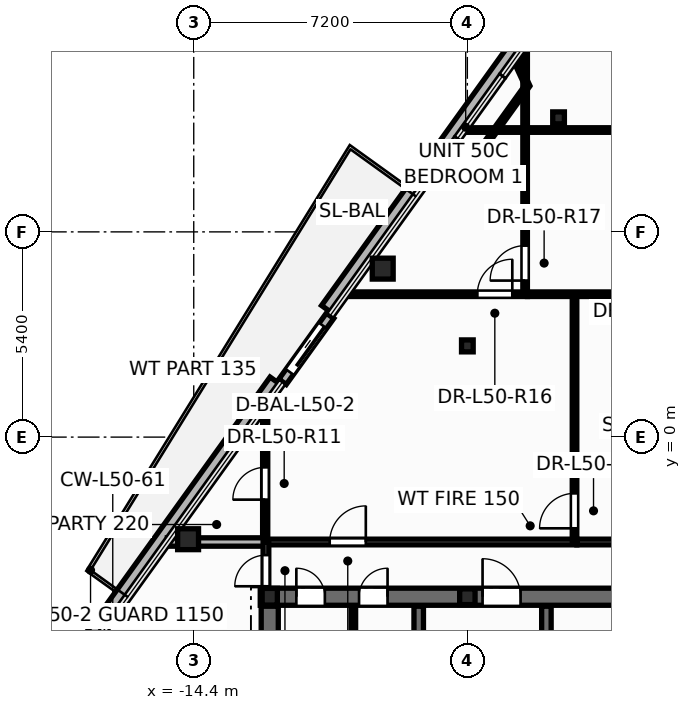
"""IFC4 building model, lengths in metres.
Left out: names, types, materials, properties, quantities, classifications, styles, units other than length and angle.
Written with IfcOpenShell. Run it as: python <this file> out.ifc"""

import sys

from ifc_helpers import new_model, si_unit, direction, frame, frame_2d, origin, origin_2d, place, context, subcontext, project, spatial, rectangle, hollow_circle, i_section, extrude, element, fill, save


model = new_model("IFC4")
c1 = context("Model", 3, precision=1e-05, world=origin(), true_north=direction((0.0, 1.0)))
c2 = subcontext(c1, "Body", "Model", "MODEL_VIEW")
j1 = project(units=[si_unit("LENGTHUNIT", "METRE"), si_unit("PLANEANGLEUNIT", "RADIAN")], contexts=[c1])
p1 = place(None, origin())
s1 = spatial("IfcSite", under=j1, at=p1, CompositionType="ELEMENT")
p2 = place(p1, origin())
s2 = spatial("IfcBuilding", under=s1, at=p2, CompositionType="ELEMENT")
p3 = place(p2, frame((0.0, 0.0, 192.9)))
s3 = spatial("IfcBuildingStorey", under=s2, at=p3, CompositionType="ELEMENT", Elevation=192.9)
for number, where, z_axis, x_axis in (
    (1, (-9.427, 4.433, 0.0), (0.0, 0.0, 1.0), (1.0, 0.0, 0.0)),
    (2, (-14.549, -2.686, 0.0), (0.0, 0.0, 1.0), (1.0, 0.0, 0.0)),
):
    element("IfcColumn", number, at=place(p3, frame(where, z_axis=z_axis, x_axis=x_axis)), inside=s3, PredefinedType="COLUMN", context=c2, shape_type="SweptSolid", body=[
        extrude(hollow_circle(Radius=0.275, WallThickness=0.024, at=origin_2d()), origin(), (0.0, 0.0, 1.0), 3.6),
    ])
p4 = place(p3, frame((-12.4, -4.2, 0.0), z_axis=(0.0, 0.0, 1.0), x_axis=(1.0, 0.0, 0.0)))
e3 = element("IfcColumn", 3, at=p4, inside=s3, PredefinedType="COLUMN", context=c2, shape_type="SweptSolid", body=[
    extrude(i_section(OverallWidth=0.4, OverallDepth=0.44, WebThickness=0.028, FlangeThickness=0.04, at=origin_2d()), origin(), (0.0, 0.0, 1.0), 3.6),
])
p5 = place(p3, frame((-7.2, -4.2, 0.0), z_axis=(0.0, 0.0, 1.0), x_axis=(1.0, 0.0, 0.0)))
e4 = element("IfcColumn", 4, at=p5, inside=s3, PredefinedType="PILASTER", context=c2, shape_type="SweptSolid", body=[
    extrude(i_section(OverallWidth=0.405, OverallDepth=0.414, WebThickness=0.022, FlangeThickness=0.032, at=origin_2d()), origin(), (0.0, 0.0, 1.0), 3.6),
])
for number, where, z_axis, x_axis in (
    (5, (-7.2, 2.4, 0.0), (0.0, 0.0, 1.0), (1.0, 0.0, 0.0)),
    (6, (-4.8, 8.4, 0.0), (0.0, 0.0, 1.0), (1.0, 0.0, 0.0)),
):
    element("IfcColumn", number, at=place(p3, frame(where, z_axis=z_axis, x_axis=x_axis)), inside=s3, PredefinedType="COLUMN", context=c2, shape_type="SweptSolid", body=[
        extrude(i_section(OverallWidth=0.307, OverallDepth=0.314, WebThickness=0.012, FlangeThickness=0.019, at=origin_2d()), origin(), (0.0, 0.0, 1.0), 3.6),
    ])
p6 = place(p3, frame((-3.857, 13.135, -0.2), z_axis=(0.0, 0.0, 1.0), x_axis=(-0.583988536217, -0.811761904481, 0.0)))
e7 = element("IfcWall", 7, at=p6, inside=s3, PredefinedType="PARAPET", context=c2, shape_type="SweptSolid", body=[
    extrude(rectangle(XDim=12.043, YDim=0.36, at=frame_2d((6.022, 0.0))), origin(), (0.0, 0.0, 1.0), 0.38),
])
p7 = place(p3, frame((-12.245, 1.475, -0.2), z_axis=(0.0, 0.0, 1.0), x_axis=(-0.583980615351, -0.811767602762, 0.0)))
e8 = element("IfcWall", 8, at=p7, inside=s3, PredefinedType="PARAPET", context=c2, shape_type="SweptSolid", body=[
    extrude(rectangle(XDim=15.123, YDim=0.36, at=frame_2d((7.562, 0.0))), origin(), (0.0, 0.0, 1.0), 0.38),
])
p8 = place(p3, frame((-10.813, 3.192, -0.015), z_axis=(0.0, 0.0, 1.0), x_axis=(-0.583965085393, -0.811778774693, 0.0)))
e9 = element("IfcWall", 9, at=p8, inside=s3, PredefinedType="STANDARD", context=c2, shape_type="SweptSolid", body=[
    extrude(rectangle(XDim=2.14, YDim=0.24, at=frame_2d((1.07, 0.0))), origin(), (0.0, 0.0, 1.0), 2.807),
])
p9 = place(p8, frame((0.32, 0.0, 0.015)))
e10 = element("IfcOpeningElement", 10, at=p9, cuts=e9, PredefinedType="OPENING", context=c2, shape_type="SweptSolid", body=[
    extrude(rectangle(XDim=1.506, YDim=2.204, at=frame_2d((0.75, 1.102))), frame((0.0, 0.13, 0.0), z_axis=(0.0, -1.0, 0.0), x_axis=(1.0, 0.0, 0.0)), (0.0, 0.0, 1.0), 0.26),
])
p10 = place(p3, frame((-10.2, -5.52, 0.0), z_axis=(0.0, 0.0, 1.0), x_axis=(0.0, 1.0, 0.0)))
e11 = element("IfcWall", 11, at=p10, inside=s3, PredefinedType="PARTITIONING", context=c2, shape_type="SweptSolid", body=[
    extrude(rectangle(XDim=1.12, YDim=0.12, at=frame_2d((0.56, 0.0))), origin(), (0.0, 0.0, 1.0), 3.35),
])
p11 = place(p3, frame((-12.65, -4.2, 0.0), z_axis=(0.0, 0.0, 1.0), x_axis=(1.0, 0.0, 0.0)))
e12 = element("IfcWall", 12, at=p11, inside=s3, PredefinedType="SHEAR", context=c2, shape_type="SweptSolid", body=[
    extrude(rectangle(XDim=25.3, YDim=0.45, at=frame_2d((12.65, 0.0))), origin(), (0.0, 0.0, 1.0), 3.6),
])
p12 = place(p11, frame((0.95, 0.0, 0.0)))
e13 = element("IfcOpeningElement", 13, at=p12, cuts=e12, PredefinedType="OPENING", context=c2, shape_type="SweptSolid", body=[
    extrude(rectangle(XDim=0.756, YDim=2.054, at=frame_2d((0.375, 1.027))), frame((0.0, 0.235, 0.0), z_axis=(0.0, -1.0, 0.0), x_axis=(1.0, 0.0, 0.0)), (0.0, 0.0, 1.0), 0.47),
])
p13 = place(p11, frame((2.6, 0.0, 0.0)))
e14 = element("IfcOpeningElement", 14, at=p13, cuts=e12, PredefinedType="OPENING", context=c2, shape_type="SweptSolid", body=[
    extrude(rectangle(XDim=0.756, YDim=2.054, at=frame_2d((0.375, 1.027))), frame((0.0, 0.235, 0.0), z_axis=(0.0, -1.0, 0.0), x_axis=(1.0, 0.0, 0.0)), (0.0, 0.0, 1.0), 0.47),
])
p14 = place(p11, frame((21.85, 0.0, 0.0)))
e15 = element("IfcOpeningElement", 15, at=p14, cuts=e12, PredefinedType="OPENING", context=c2, shape_type="SweptSolid", body=[
    extrude(rectangle(XDim=0.756, YDim=2.054, at=frame_2d((0.375, 1.027))), frame((0.0, 0.235, 0.0), z_axis=(0.0, -1.0, 0.0), x_axis=(1.0, 0.0, 0.0)), (0.0, 0.0, 1.0), 0.47),
])
p15 = place(p11, frame((23.5, 0.0, 0.0)))
e16 = element("IfcOpeningElement", 16, at=p15, cuts=e12, PredefinedType="OPENING", context=c2, shape_type="SweptSolid", body=[
    extrude(rectangle(XDim=0.756, YDim=2.054, at=frame_2d((0.375, 1.027))), frame((0.0, 0.235, 0.0), z_axis=(0.0, -1.0, 0.0), x_axis=(1.0, 0.0, 0.0)), (0.0, 0.0, 1.0), 0.47),
])
p16 = place(p11, frame((5.85, 0.0, 0.0)))
e17 = element("IfcOpeningElement", 17, at=p16, cuts=e12, PredefinedType="OPENING", context=c2, shape_type="SweptSolid", body=[
    extrude(rectangle(XDim=1.006, YDim=2.104, at=frame_2d((0.5, 1.052))), frame((0.0, 0.235, 0.0), z_axis=(0.0, -1.0, 0.0), x_axis=(1.0, 0.0, 0.0)), (0.0, 0.0, 1.0), 0.47),
])
p17 = place(p11, frame((10.35, 0.0, 0.0)))
e18 = element("IfcOpeningElement", 18, at=p17, cuts=e12, PredefinedType="OPENING", context=c2, shape_type="SweptSolid", body=[
    extrude(rectangle(XDim=1.406, YDim=2.154, at=frame_2d((0.7, 1.077))), frame((0.0, 0.235, 0.0), z_axis=(0.0, -1.0, 0.0), x_axis=(1.0, 0.0, 0.0)), (0.0, 0.0, 1.0), 0.47),
])
p18 = place(p11, frame((18.45, 0.0, 0.0)))
e19 = element("IfcOpeningElement", 19, at=p18, cuts=e12, PredefinedType="OPENING", context=c2, shape_type="SweptSolid", body=[
    extrude(rectangle(XDim=1.006, YDim=2.104, at=frame_2d((0.5, 1.052))), frame((0.0, 0.235, 0.0), z_axis=(0.0, -1.0, 0.0), x_axis=(1.0, 0.0, 0.0)), (0.0, 0.0, 1.0), 0.47),
])
p19 = place(p3, frame((-8.48, -13.85, 0.0), z_axis=(0.0, 0.0, 1.0), x_axis=(0.0, 1.0, 0.0)))
e20 = element("IfcWall", 20, at=p19, inside=s3, PredefinedType="SHEAR", context=c2, shape_type="SweptSolid", body=[
    extrude(rectangle(XDim=9.4, YDim=0.25, at=frame_2d((4.7, 0.0))), origin(), (0.0, 0.0, 1.0), 3.6),
])
p20 = place(p19, frame((6.95, 0.0, 0.0)))
e21 = element("IfcOpeningElement", 21, at=p20, cuts=e20, PredefinedType="OPENING", context=c2, shape_type="SweptSolid", body=[
    extrude(rectangle(XDim=1.006, YDim=2.104, at=frame_2d((0.5, 1.052))), frame((0.0, 0.135, 0.0), z_axis=(0.0, -1.0, 0.0), x_axis=(1.0, 0.0, 0.0)), (0.0, 0.0, 1.0), 0.27),
])
p21 = place(p3, frame((-5.12, -13.85, 0.0), z_axis=(0.0, 0.0, 1.0), x_axis=(0.0, 1.0, 0.0)))
e22 = element("IfcWall", 22, at=p21, inside=s3, PredefinedType="SHEAR", context=c2, shape_type="SweptSolid", body=[
    extrude(rectangle(XDim=9.4, YDim=0.25, at=frame_2d((4.7, 0.0))), origin(), (0.0, 0.0, 1.0), 3.6),
])
p22 = place(p3, frame((-12.4, -13.85, 0.0), z_axis=(0.0, 0.0, 1.0), x_axis=(0.0, 1.0, 0.0)))
e23 = element("IfcWall", 23, at=p22, inside=s3, PredefinedType="SHEAR", context=c2, shape_type="SweptSolid", body=[
    extrude(rectangle(XDim=9.4, YDim=0.45, at=frame_2d((4.7, 0.0))), origin(), (0.0, 0.0, 1.0), 3.6),
])
p23 = place(p3, frame((-12.5, -2.76, 0.0), z_axis=(0.0, 0.0, 1.0), x_axis=(1.0, 0.0, 0.0)))
e24 = element("IfcWall", 24, at=p23, inside=s3, PredefinedType="PARTITIONING", context=c2, shape_type="SweptSolid", body=[
    extrude(rectangle(XDim=8.18, YDim=0.15, at=frame_2d((4.09, 0.0))), origin(), (0.0, 0.0, 1.0), 2.325),
])
p24 = place(p23, frame((1.678, 0.0, 0.0)))
e25 = element("IfcOpeningElement", 25, at=p24, cuts=e24, PredefinedType="OPENING", context=c2, shape_type="SweptSolid", body=[
    extrude(rectangle(XDim=0.956, YDim=2.104, at=frame_2d((0.475, 1.052))), frame((0.0, 0.085, 0.0), z_axis=(0.0, -1.0, 0.0), x_axis=(1.0, 0.0, 0.0)), (0.0, 0.0, 1.0), 0.17),
])
p25 = place(p3, frame((-5.68, 3.76, 0.0), z_axis=(0.0, 0.0, 1.0), x_axis=(0.0, 1.0, 0.0)))
e26 = element("IfcWall", 26, at=p25, inside=s3, PredefinedType="PARTITIONING", context=c2, shape_type="SweptSolid", body=[
    extrude(rectangle(XDim=6.567, YDim=0.12, at=frame_2d((3.283, 0.0))), origin(), (0.0, 0.0, 1.0), 2.625),
])
p26 = place(p25, frame((0.358, 0.0, 0.0)))
e27 = element("IfcOpeningElement", 27, at=p26, cuts=e26, PredefinedType="OPENING", context=c2, shape_type="SweptSolid", body=[
    extrude(rectangle(XDim=0.926, YDim=2.104, at=frame_2d((0.46, 1.052))), frame((0.0, 0.07, 0.0), z_axis=(0.0, -1.0, 0.0), x_axis=(1.0, 0.0, 0.0)), (0.0, 0.0, 1.0), 0.14),
])
p27 = place(p3, frame((-4.38, -2.76, 0.0), z_axis=(0.0, 0.0, 1.0), x_axis=(0.0, 1.0, 0.0)))
e28 = element("IfcWall", 28, at=p27, inside=s3, PredefinedType="PARTITIONING", context=c2, shape_type="SweptSolid", body=[
    extrude(rectangle(XDim=6.52, YDim=0.12, at=frame_2d((3.26, 0.0))), origin(), (0.0, 0.0, 1.0), 2.325),
])
p28 = place(p27, frame((0.36, 0.0, 0.0)))
e29 = element("IfcOpeningElement", 29, at=p28, cuts=e28, PredefinedType="OPENING", context=c2, shape_type="SweptSolid", body=[
    extrude(rectangle(XDim=0.926, YDim=2.104, at=frame_2d((0.46, 1.052))), frame((0.0, 0.07, 0.0), z_axis=(0.0, -1.0, 0.0), x_axis=(1.0, 0.0, 0.0)), (0.0, 0.0, 1.0), 0.14),
])
p29 = place(p3, frame((-7.296, 8.08, 0.0), z_axis=(0.0, 0.0, 1.0), x_axis=(1.0, 0.0, 0.0)))
e30 = element("IfcWall", 30, at=p29, inside=s3, PredefinedType="PARTITIONING", context=c2, shape_type="SweptSolid", body=[
    extrude(rectangle(XDim=6.396, YDim=0.12, at=frame_2d((3.198, 0.0))), origin(), (0.0, 0.0, 1.0), 2.625),
])
p30 = place(p29, frame((4.441, 0.0, 0.0)))
e31 = element("IfcOpeningElement", 31, at=p30, cuts=e30, PredefinedType="OPENING", context=c2, shape_type="SweptSolid", body=[
    extrude(rectangle(XDim=0.926, YDim=2.104, at=frame_2d((0.46, 1.052))), frame((0.0, 0.07, 0.0), z_axis=(0.0, -1.0, 0.0), x_axis=(1.0, 0.0, 0.0)), (0.0, 0.0, 1.0), 0.14),
])
p31 = place(p3, frame((-4.318, -2.76, 0.0), z_axis=(0.0, 0.0, 1.0), x_axis=(1.0, 0.0, 0.0)))
e32 = element("IfcWall", 32, at=p31, inside=s3, PredefinedType="PARTITIONING", context=c2, shape_type="SweptSolid", body=[
    extrude(rectangle(XDim=16.818, YDim=0.15, at=frame_2d((8.409, 0.0))), origin(), (0.0, 0.0, 1.0), 2.325),
])
p32 = place(p3, frame((-10.404, 3.76, 0.0), z_axis=(0.0, 0.0, 1.0), x_axis=(1.0, 0.0, 0.0)))
e33 = element("IfcWall", 33, at=p32, inside=s3, PredefinedType="PARTITIONING", context=c2, shape_type="SweptSolid", body=[
    extrude(rectangle(XDim=4.784, YDim=0.12, at=frame_2d((2.392, 0.0))), origin(), (0.0, 0.0, 1.0), 2.625),
])
p33 = place(p32, frame((3.467, 0.0, 0.0)))
e34 = element("IfcOpeningElement", 34, at=p33, cuts=e33, PredefinedType="OPENING", context=c2, shape_type="SweptSolid", body=[
    extrude(rectangle(XDim=0.926, YDim=2.104, at=frame_2d((0.46, 1.052))), frame((0.0, 0.07, 0.0), z_axis=(0.0, -1.0, 0.0), x_axis=(1.0, 0.0, 0.0)), (0.0, 0.0, 1.0), 0.14),
])
p34 = place(p3, frame((-12.52, -2.76, 0.0), z_axis=(0.0, 0.0, 1.0), x_axis=(0.0, 1.0, 0.0)))
e35 = element("IfcWall", 35, at=p34, inside=s3, PredefinedType="PARTITIONING", context=c2, shape_type="SweptSolid", body=[
    extrude(rectangle(XDim=3.579, YDim=0.135, at=frame_2d((1.79, 0.0))), origin(), (0.0, 0.0, 1.0), 2.625),
])
p35 = place(p34, frame((1.115, 0.0, 0.0)))
e36 = element("IfcOpeningElement", 36, at=p35, cuts=e35, PredefinedType="OPENING", context=c2, shape_type="SweptSolid", body=[
    extrude(rectangle(XDim=0.856, YDim=2.104, at=frame_2d((0.425, 1.052))), frame((0.0, 0.078, 0.0), z_axis=(0.0, -1.0, 0.0), x_axis=(1.0, 0.0, 0.0)), (0.0, 0.0, 1.0), 0.155),
])
p36 = place(p3, frame((-5.618, 3.76, 0.0), z_axis=(0.0, 0.0, 1.0), x_axis=(1.0, 0.0, 0.0)))
e37 = element("IfcWall", 37, at=p36, inside=s3, PredefinedType="PARTITIONING", context=c2, shape_type="SweptSolid", body=[
    extrude(rectangle(XDim=4.656, YDim=0.12, at=frame_2d((2.328, 0.0))), origin(), (0.0, 0.0, 1.0), 2.969),
])
p37 = place(p3, frame((-15.095, -2.76, 0.0), z_axis=(0.0, 0.0, 1.0), x_axis=(1.0, 0.0, 0.0)))
e38 = element("IfcWall", 38, at=p37, inside=s3, PredefinedType="PARTITIONING", context=c2, shape_type="SweptSolid", body=[
    extrude(rectangle(XDim=2.595, YDim=0.22, at=frame_2d((1.297, 0.0))), origin(), (0.0, 0.0, 1.0), 2.625),
])
p38 = place(p3, frame((-5.62, 9.246, 0.0), z_axis=(0.0, 0.0, 1.0), x_axis=(-0.583982880723, -0.811765973063, 0.0)))
e39 = element("IfcWall", 39, at=p38, inside=s3, PredefinedType="PARTITIONING", context=c2, shape_type="SweptSolid", body=[
    extrude(rectangle(XDim=2.378, YDim=0.12, at=frame_2d((1.189, 0.0))), origin(), (0.0, 0.0, 1.0), 3.35),
])
p39 = place(p3, frame((-12.5, -4.24, 0.0), z_axis=(0.0, 0.0, 1.0), x_axis=(0.0, 1.0, 0.0)))
e40 = element("IfcWall", 40, at=p39, inside=s3, PredefinedType="PARTITIONING", context=c2, shape_type="SweptSolid", body=[
    extrude(rectangle(XDim=1.48, YDim=0.15, at=frame_2d((0.74, 0.0))), origin(), (0.0, 0.0, 1.0), 2.325),
])
p40 = place(p39, frame((0.315, 0.0, 0.0)))
e41 = element("IfcOpeningElement", 41, at=p40, cuts=e40, PredefinedType="OPENING", context=c2, shape_type="SweptSolid", body=[
    extrude(rectangle(XDim=0.826, YDim=2.104, at=frame_2d((0.41, 1.052))), frame((0.0, 0.085, 0.0), z_axis=(0.0, -1.0, 0.0), x_axis=(1.0, 0.0, 0.0)), (0.0, 0.0, 1.0), 0.17),
])
p41 = place(p3, frame((-5.943, 9.945, 0.0), z_axis=(0.0, 0.0, 1.0), x_axis=(0.418957614544, -0.9080057914, 0.0)))
e42 = element("IfcWall", 42, at=p41, inside=s3, PredefinedType="PARTITIONING", context=c2, shape_type="SweptSolid", body=[
    extrude(rectangle(XDim=0.77, YDim=0.12, at=frame_2d((0.385, 0.0))), origin(), (0.0, 0.0, 1.0), 2.792),
])
p42 = place(p3, frame((-7.009, 7.315, 0.0), z_axis=(0.0, 0.0, 1.0), x_axis=(-0.811734696256, 0.584026354622, 0.0)))
e43 = element("IfcWall", 43, at=p42, inside=s3, PredefinedType="PARTITIONING", context=c2, shape_type="SweptSolid", body=[
    extrude(rectangle(XDim=0.67, YDim=0.12, at=frame_2d((0.335, 0.0))), origin(), (0.0, 0.0, 1.0), 2.792),
])
p43 = place(p9, origin())
e44 = element("IfcDoor", 44, at=p43, inside=s3, OperationType="SLIDING_TO_RIGHT", PredefinedType="DOOR", context=c2, shape_type="SweptSolid", body=[
    extrude(rectangle(XDim=1.5, YDim=2.2, at=frame_2d((0.75, 1.1))), frame((0.0, 0.025, 0.0), z_axis=(0.0, -1.0, 0.0), x_axis=(1.0, 0.0, 0.0)), (0.0, 0.0, 1.0), 0.05),
])
fill(e10, e44)
p44 = place(p12, origin())
e45 = element("IfcDoor", 45, at=p44, inside=s3, OperationType="SINGLE_SWING_LEFT", PredefinedType="DOOR", context=c2, shape_type="SweptSolid", body=[
    extrude(rectangle(XDim=0.75, YDim=2.05, at=frame_2d((0.375, 1.025))), frame((0.0, 0.025, 0.0), z_axis=(0.0, -1.0, 0.0), x_axis=(1.0, 0.0, 0.0)), (0.0, 0.0, 1.0), 0.05),
])
fill(e13, e45)
p45 = place(p13, origin())
e46 = element("IfcDoor", 46, at=p45, inside=s3, OperationType="SINGLE_SWING_RIGHT", PredefinedType="DOOR", context=c2, shape_type="SweptSolid", body=[
    extrude(rectangle(XDim=0.75, YDim=2.05, at=frame_2d((0.375, 1.025))), frame((0.0, 0.025, 0.0), z_axis=(0.0, -1.0, 0.0), x_axis=(1.0, 0.0, 0.0)), (0.0, 0.0, 1.0), 0.05),
])
fill(e14, e46)
p46 = place(p16, origin())
e47 = element("IfcDoor", 47, at=p46, inside=s3, OperationType="SINGLE_SWING_LEFT", PredefinedType="DOOR", context=c2, shape_type="SweptSolid", body=[
    extrude(rectangle(XDim=1.0, YDim=2.1, at=frame_2d((0.5, 1.05))), frame((0.0, 0.025, 0.0), z_axis=(0.0, -1.0, 0.0), x_axis=(1.0, 0.0, 0.0)), (0.0, 0.0, 1.0), 0.05),
])
fill(e17, e47)
p47 = place(p40, origin())
e48 = element("IfcDoor", 48, at=p47, inside=s3, OperationType="SINGLE_SWING_LEFT", PredefinedType="DOOR", context=c2, shape_type="SweptSolid", body=[
    extrude(rectangle(XDim=0.82, YDim=2.1, at=frame_2d((0.41, 1.05))), frame((0.0, 0.025, 0.0), z_axis=(0.0, -1.0, 0.0), x_axis=(1.0, 0.0, 0.0)), (0.0, 0.0, 1.0), 0.05),
])
fill(e41, e48)
p48 = place(p35, origin())
e49 = element("IfcDoor", 49, at=p48, inside=s3, OperationType="SINGLE_SWING_LEFT", PredefinedType="DOOR", context=c2, shape_type="SweptSolid", body=[
    extrude(rectangle(XDim=0.85, YDim=2.1, at=frame_2d((0.425, 1.05))), frame((0.0, 0.025, 0.0), z_axis=(0.0, -1.0, 0.0), x_axis=(1.0, 0.0, 0.0)), (0.0, 0.0, 1.0), 0.05),
])
fill(e36, e49)
p49 = place(p24, origin())
e50 = element("IfcDoor", 50, at=p49, inside=s3, OperationType="SINGLE_SWING_RIGHT", PredefinedType="DOOR", context=c2, shape_type="SweptSolid", body=[
    extrude(rectangle(XDim=0.95, YDim=2.1, at=frame_2d((0.475, 1.05))), frame((0.0, 0.025, 0.0), z_axis=(0.0, -1.0, 0.0), x_axis=(1.0, 0.0, 0.0)), (0.0, 0.0, 1.0), 0.05),
])
fill(e25, e50)
p50 = place(p28, origin())
e51 = element("IfcDoor", 51, at=p50, inside=s3, OperationType="SINGLE_SWING_LEFT", PredefinedType="DOOR", context=c2, shape_type="SweptSolid", body=[
    extrude(rectangle(XDim=0.92, YDim=2.1, at=frame_2d((0.46, 1.05))), frame((0.0, 0.025, 0.0), z_axis=(0.0, -1.0, 0.0), x_axis=(1.0, 0.0, 0.0)), (0.0, 0.0, 1.0), 0.05),
])
fill(e29, e51)
p51 = place(p33, origin())
e52 = element("IfcDoor", 52, at=p51, inside=s3, OperationType="SINGLE_SWING_RIGHT", PredefinedType="DOOR", context=c2, shape_type="SweptSolid", body=[
    extrude(rectangle(XDim=0.92, YDim=2.1, at=frame_2d((0.46, 1.05))), frame((0.0, 0.025, 0.0), z_axis=(0.0, -1.0, 0.0), x_axis=(1.0, 0.0, 0.0)), (0.0, 0.0, 1.0), 0.05),
])
fill(e34, e52)
p52 = place(p26, origin())
e53 = element("IfcDoor", 53, at=p52, inside=s3, OperationType="SINGLE_SWING_LEFT", PredefinedType="DOOR", context=c2, shape_type="SweptSolid", body=[
    extrude(rectangle(XDim=0.92, YDim=2.1, at=frame_2d((0.46, 1.05))), frame((0.0, 0.025, 0.0), z_axis=(0.0, -1.0, 0.0), x_axis=(1.0, 0.0, 0.0)), (0.0, 0.0, 1.0), 0.05),
])
fill(e27, e53)
save(model, sys.argv[1])
